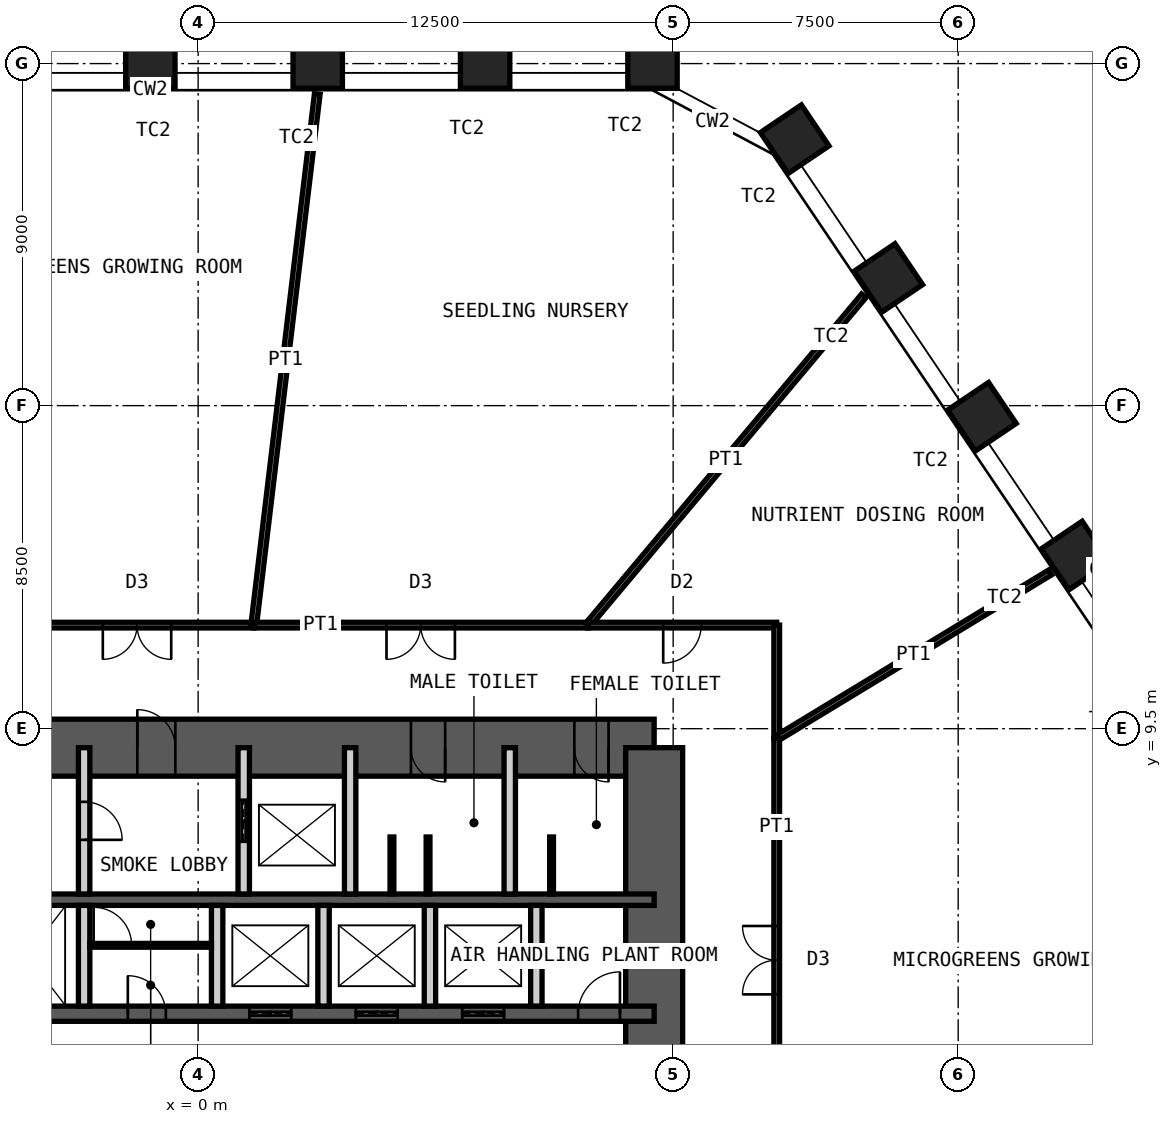
"""IFC4 building model, lengths in metres.
Left out: names, types, materials, properties, quantities, classifications, styles, units other than length and angle.
Written with IfcOpenShell. Run it as: python <this file> out.ifc"""

import sys

from ifc_helpers import new_model, si_unit, direction, frame, frame_2d, origin, origin_2d, place, context, subcontext, project, spatial, rectangle, hollow_rectangle, extrude, element, fill, save


model = new_model("IFC4")
c1 = context("Model", 3, precision=1e-05, world=origin(), true_north=direction((0.0, 1.0)))
c2 = subcontext(c1, "Body", "Model", "MODEL_VIEW")
j1 = project(units=[si_unit("LENGTHUNIT", "METRE"), si_unit("PLANEANGLEUNIT", "RADIAN")], contexts=[c1])
p1 = place(None, origin())
s1 = spatial("IfcSite", under=j1, at=p1, CompositionType="ELEMENT")
p2 = place(p1, origin())
s2 = spatial("IfcBuilding", under=s1, at=p2, CompositionType="ELEMENT")
p3 = place(p2, frame((0.0, 0.0, 87.0)))
s3 = spatial("IfcBuildingStorey", under=s2, at=p3, CompositionType="ELEMENT", Elevation=87.0)
for number, where, z_axis, x_axis in (
    (1, (-1.258, 27.0, 0.0), (0.0, 0.0, 1.0), (-1.0, 0.0, 0.0)),
    (2, (3.147, 27.0, 0.0), (0.0, 0.0, 1.0), (-1.0, 0.0, 0.0)),
    (3, (7.552, 27.0, 0.0), (0.0, 0.0, 1.0), (-1.0, 0.0, 0.0)),
    (4, (11.956, 27.0, 0.0), (0.0, 0.0, 1.0), (-1.0, 0.0, 0.0)),
    (5, (15.698, 25.01, 0.0), (0.0, 0.0, 1.0), (-0.559, 0.829, 0.0)),
    (6, (18.161, 21.359, 0.0), (0.0, 0.0, 1.0), (-0.559, 0.829, 0.0)),
    (7, (20.624, 17.707, 0.0), (0.0, 0.0, 1.0), (-0.559, 0.829, 0.0)),
    (8, (23.087, 14.056, 0.0), (0.0, 0.0, 1.0), (-0.559, 0.829, 0.0)),
):
    element("IfcColumn", number, at=place(p3, frame(where, z_axis=z_axis, x_axis=x_axis)), inside=s3, PredefinedType="COLUMN", context=c2, shape_type="SweptSolid", body=[
        extrude(hollow_rectangle(XDim=1.3, YDim=1.3, WallThickness=0.1, at=origin_2d()), origin(), (0.0, 0.0, 1.0), 5.0),
    ])
p4 = place(p3, frame((-12.0, 9.0, 0.0), z_axis=(0.0, 0.0, 1.0), x_axis=(1.0, 0.0, 0.0)))
e9 = element("IfcWall", 9, at=p4, inside=s3, PredefinedType="SHEAR", context=c2, shape_type="SweptSolid", body=[
    extrude(rectangle(XDim=24.0, YDim=1.5, at=frame_2d((12.0, 0.0))), origin(), (0.0, 0.0, 1.0), 5.0),
])
p5 = place(p4, frame((10.4, 0.0, 0.0)))
e10 = element("IfcOpeningElement", 10, at=p5, cuts=e9, PredefinedType="OPENING", context=c2, shape_type="SweptSolid", body=[
    extrude(rectangle(XDim=1.0, YDim=2.1, at=frame_2d((0.5, 1.05))), frame((0.0, 0.76, 0.0), z_axis=(0.0, -1.0, 0.0), x_axis=(1.0, 0.0, 0.0)), (0.0, 0.0, 1.0), 1.52),
])
p6 = place(p4, frame((17.6, 0.0, 0.0)))
e11 = element("IfcOpeningElement", 11, at=p6, cuts=e9, PredefinedType="OPENING", context=c2, shape_type="SweptSolid", body=[
    extrude(rectangle(XDim=0.9, YDim=2.1, at=frame_2d((0.45, 1.05))), frame((0.0, 0.76, 0.0), z_axis=(0.0, -1.0, 0.0), x_axis=(1.0, 0.0, 0.0)), (0.0, 0.0, 1.0), 1.52),
])
p7 = place(p4, frame((21.9, 0.0, 0.0)))
e12 = element("IfcOpeningElement", 12, at=p7, cuts=e9, PredefinedType="OPENING", context=c2, shape_type="SweptSolid", body=[
    extrude(rectangle(XDim=0.9, YDim=2.1, at=frame_2d((0.45, 1.05))), frame((0.0, 0.76, 0.0), z_axis=(0.0, -1.0, 0.0), x_axis=(1.0, 0.0, 0.0)), (0.0, 0.0, 1.0), 1.52),
])
p8 = place(p3, frame((12.0, -9.0, 0.0), z_axis=(0.0, 0.0, 1.0), x_axis=(0.0, 1.0, 0.0)))
e13 = element("IfcWall", 13, at=p8, inside=s3, PredefinedType="SHEAR", context=c2, shape_type="SweptSolid", body=[
    extrude(rectangle(XDim=18.0, YDim=1.5, at=frame_2d((9.0, 0.0))), origin(), (0.0, 0.0, 1.0), 5.0),
])
p9 = place(p8, frame((8.1, 0.0, 0.0)))
e14 = element("IfcOpeningElement", 14, at=p9, cuts=e13, PredefinedType="OPENING", context=c2, shape_type="SweptSolid", body=[
    extrude(rectangle(XDim=1.8, YDim=2.1, at=frame_2d((0.9, 1.05))), frame((0.0, 0.76, 0.0), z_axis=(0.0, -1.0, 0.0), x_axis=(1.0, 0.0, 0.0)), (0.0, 0.0, 1.0), 1.52),
])
p10 = place(p3, frame((-12.0, 5.0, 0.0), z_axis=(0.0, 0.0, 1.0), x_axis=(1.0, 0.0, 0.0)))
e15 = element("IfcWall", 15, at=p10, inside=s3, PredefinedType="SHEAR", context=c2, shape_type="SweptSolid", body=[
    extrude(rectangle(XDim=24.0, YDim=0.3, at=frame_2d((12.0, 0.0))), origin(), (0.0, 0.0, 1.0), 5.0),
])
p11 = place(p3, frame((-12.0, 2.0, 0.0), z_axis=(0.0, 0.0, 1.0), x_axis=(1.0, 0.0, 0.0)))
e16 = element("IfcWall", 16, at=p11, inside=s3, PredefinedType="SHEAR", context=c2, shape_type="SweptSolid", body=[
    extrude(rectangle(XDim=24.0, YDim=0.4, at=frame_2d((12.0, 0.0))), origin(), (0.0, 0.0, 1.0), 5.0),
])
p12 = place(p11, frame((2.4, 0.0, 0.0)))
e17 = element("IfcOpeningElement", 17, at=p12, cuts=e16, PredefinedType="OPENING", context=c2, shape_type="SweptSolid", body=[
    extrude(rectangle(XDim=1.1, YDim=2.1, at=frame_2d((0.55, 1.05))), frame((0.0, 0.21, 0.0), z_axis=(0.0, -1.0, 0.0), x_axis=(1.0, 0.0, 0.0)), (0.0, 0.0, 1.0), 0.42),
])
p13 = place(p11, frame((22.0, 0.0, 0.0)))
e18 = element("IfcOpeningElement", 18, at=p13, cuts=e16, PredefinedType="OPENING", context=c2, shape_type="SweptSolid", body=[
    extrude(rectangle(XDim=1.1, YDim=2.1, at=frame_2d((0.55, 1.05))), frame((0.0, 0.21, 0.0), z_axis=(0.0, -1.0, 0.0), x_axis=(1.0, 0.0, 0.0)), (0.0, 0.0, 1.0), 0.42),
])
p14 = place(p11, frame((10.15, 0.0, 0.0)))
e19 = element("IfcOpeningElement", 19, at=p14, cuts=e16, PredefinedType="OPENING", context=c2, shape_type="SweptSolid", body=[
    extrude(rectangle(XDim=1.0, YDim=2.1, at=frame_2d((0.5, 1.05))), frame((0.0, 0.21, 0.0), z_axis=(0.0, -1.0, 0.0), x_axis=(1.0, 0.0, 0.0)), (0.0, 0.0, 1.0), 0.42),
])
p15 = place(p11, frame((6.7, 0.0, 0.0)))
e20 = element("IfcOpeningElement", 20, at=p15, cuts=e16, PredefinedType="OPENING", context=c2, shape_type="SweptSolid", body=[
    extrude(rectangle(XDim=1.4, YDim=2.4, at=frame_2d((0.7, 1.2))), frame((0.0, 0.21, 0.0), z_axis=(0.0, -1.0, 0.0), x_axis=(1.0, 0.0, 0.0)), (0.0, 0.0, 1.0), 0.42),
])
p16 = place(p11, frame((13.35, 0.0, 0.0)))
e21 = element("IfcOpeningElement", 21, at=p16, cuts=e16, PredefinedType="OPENING", context=c2, shape_type="SweptSolid", body=[
    extrude(rectangle(XDim=1.1, YDim=2.4, at=frame_2d((0.55, 1.2))), frame((0.0, 0.21, 0.0), z_axis=(0.0, -1.0, 0.0), x_axis=(1.0, 0.0, 0.0)), (0.0, 0.0, 1.0), 0.42),
])
p17 = place(p11, frame((16.15, 0.0, 0.0)))
e22 = element("IfcOpeningElement", 22, at=p17, cuts=e16, PredefinedType="OPENING", context=c2, shape_type="SweptSolid", body=[
    extrude(rectangle(XDim=1.1, YDim=2.4, at=frame_2d((0.55, 1.2))), frame((0.0, 0.21, 0.0), z_axis=(0.0, -1.0, 0.0), x_axis=(1.0, 0.0, 0.0)), (0.0, 0.0, 1.0), 0.42),
])
p18 = place(p11, frame((18.95, 0.0, 0.0)))
e23 = element("IfcOpeningElement", 23, at=p18, cuts=e16, PredefinedType="OPENING", context=c2, shape_type="SweptSolid", body=[
    extrude(rectangle(XDim=1.1, YDim=2.4, at=frame_2d((0.55, 1.2))), frame((0.0, 0.21, 0.0), z_axis=(0.0, -1.0, 0.0), x_axis=(1.0, 0.0, 0.0)), (0.0, 0.0, 1.0), 0.42),
])
p19 = place(p3, frame((-3.0, 5.15, 0.0), z_axis=(0.0, 0.0, 1.0), x_axis=(0.0, 1.0, 0.0)))
e24 = element("IfcWall", 24, at=p19, inside=s3, PredefinedType="PARTITIONING", context=c2, shape_type="SweptSolid", body=[
    extrude(rectangle(XDim=3.85, YDim=0.3, at=frame_2d((1.925, 0.0))), origin(), (0.0, 0.0, 1.0), 4.78),
])
p20 = place(p19, frame((1.425, 0.0, 0.0)))
e25 = element("IfcOpeningElement", 25, at=p20, cuts=e24, PredefinedType="OPENING", context=c2, shape_type="SweptSolid", body=[
    extrude(rectangle(XDim=1.0, YDim=2.1, at=frame_2d((0.5, 1.05))), frame((0.0, 0.16, 0.0), z_axis=(0.0, -1.0, 0.0), x_axis=(1.0, 0.0, 0.0)), (0.0, 0.0, 1.0), 0.32),
])
p21 = place(p3, frame((1.2, 5.15, 0.0), z_axis=(0.0, 0.0, 1.0), x_axis=(0.0, 1.0, 0.0)))
e26 = element("IfcWall", 26, at=p21, inside=s3, PredefinedType="PARTITIONING", context=c2, shape_type="SweptSolid", body=[
    extrude(rectangle(XDim=3.85, YDim=0.3, at=frame_2d((1.925, 0.0))), origin(), (0.0, 0.0, 1.0), 4.78),
])
p22 = place(p21, frame((1.375, 0.0, 0.0)))
e27 = element("IfcOpeningElement", 27, at=p22, cuts=e26, PredefinedType="OPENING", context=c2, shape_type="SweptSolid", body=[
    extrude(rectangle(XDim=1.1, YDim=2.4, at=frame_2d((0.55, 1.2))), frame((0.0, 0.16, 0.0), z_axis=(0.0, -1.0, 0.0), x_axis=(1.0, 0.0, 0.0)), (0.0, 0.0, 1.0), 0.32),
])
for number, where, z_axis, x_axis in (
    (28, (4.0, 5.15, 0.0), (0.0, 0.0, 1.0), (0.0, 1.0, 0.0)),
    (29, (8.2, 5.15, 0.0), (0.0, 0.0, 1.0), (0.0, 1.0, 0.0)),
):
    element("IfcWall", number, at=place(p3, frame(where, z_axis=z_axis, x_axis=x_axis)), inside=s3, PredefinedType="PARTITIONING", context=c2, shape_type="SweptSolid", body=[
        extrude(rectangle(XDim=3.85, YDim=0.3, at=frame_2d((1.925, 0.0))), origin(), (0.0, 0.0, 1.0), 4.78),
    ])
for number, where, z_axis, x_axis in (
    (30, (-3.0, 2.2, 0.0), (0.0, 0.0, 1.0), (0.0, 1.0, 0.0)),
    (31, (0.5, 2.2, 0.0), (0.0, 0.0, 1.0), (0.0, 1.0, 0.0)),
    (32, (3.3, 2.2, 0.0), (0.0, 0.0, 1.0), (0.0, 1.0, 0.0)),
    (33, (6.1, 2.2, 0.0), (0.0, 0.0, 1.0), (0.0, 1.0, 0.0)),
    (34, (8.9, 2.2, 0.0), (0.0, 0.0, 1.0), (0.0, 1.0, 0.0)),
):
    element("IfcWall", number, at=place(p3, frame(where, z_axis=z_axis, x_axis=x_axis)), inside=s3, PredefinedType="PARTITIONING", context=c2, shape_type="SweptSolid", body=[
        extrude(rectangle(XDim=2.65, YDim=0.3, at=frame_2d((1.325, 0.0))), origin(), (0.0, 0.0, 1.0), 4.78),
    ])
p23 = place(p3, frame((-2.85, 3.8, 0.0), z_axis=(0.0, 0.0, 1.0), x_axis=(1.0, 0.0, 0.0)))
e35 = element("IfcWall", 35, at=p23, inside=s3, PredefinedType="PARTITIONING", context=c2, shape_type="SweptSolid", body=[
    extrude(rectangle(XDim=3.2, YDim=0.1, at=frame_2d((1.6, 0.0))), origin(), (0.0, 0.0, 1.0), 4.78),
])
p24 = place(p23, frame((0.1, 0.0, 0.0)))
e36 = element("IfcOpeningElement", 36, at=p24, cuts=e35, PredefinedType="OPENING", context=c2, shape_type="SweptSolid", body=[
    extrude(rectangle(XDim=1.0, YDim=2.4, at=frame_2d((0.5, 1.2))), frame((0.0, 0.06, 0.0), z_axis=(0.0, -1.0, 0.0), x_axis=(1.0, 0.0, 0.0)), (0.0, 0.0, 1.0), 0.12),
])
for number, where, z_axis, x_axis in (
    (37, (5.1, 5.15, 0.0), (0.0, 0.0, 1.0), (0.0, 1.0, 0.0)),
    (38, (6.05, 5.15, 0.0), (0.0, 0.0, 1.0), (0.0, 1.0, 0.0)),
    (39, (9.3, 5.15, 0.0), (0.0, 0.0, 1.0), (0.0, 1.0, 0.0)),
):
    element("IfcWall", number, at=place(p3, frame(where, z_axis=z_axis, x_axis=x_axis)), inside=s3, PredefinedType="PARTITIONING", context=c2, shape_type="SweptSolid", body=[
        extrude(rectangle(XDim=1.5, YDim=0.1, at=frame_2d((0.75, 0.0))), origin(), (0.0, 0.0, 1.0), 2.1),
    ])
p25 = place(p3, frame((-4.679, 12.225, 0.0), z_axis=(0.0, 0.0, 1.0), x_axis=(1.0, 0.0, 0.0)))
e40 = element("IfcWall", 40, at=p25, inside=s3, PredefinedType="PARTITIONING", context=c2, shape_type="SweptSolid", body=[
    extrude(rectangle(XDim=6.142, YDim=0.15, at=frame_2d((3.071, 0.0))), origin(), (0.0, 0.0, 1.0), 4.8),
])
p26 = place(p25, frame((2.171, 0.0, 0.0)))
e41 = element("IfcOpeningElement", 41, at=p26, cuts=e40, PredefinedType="OPENING", context=c2, shape_type="SweptSolid", body=[
    extrude(rectangle(XDim=1.8, YDim=2.4, at=frame_2d((0.9, 1.2))), frame((0.0, 0.085, 0.0), z_axis=(0.0, -1.0, 0.0), x_axis=(1.0, 0.0, 0.0)), (0.0, 0.0, 1.0), 0.17),
])
p27 = place(p3, frame((3.135, 26.201, 0.0), z_axis=(0.0, 0.0, 1.0), x_axis=(-0.118798442734, -0.992918390405, 0.0)))
e42 = element("IfcWall", 42, at=p27, inside=s3, PredefinedType="PARTITIONING", context=c2, shape_type="SweptSolid", body=[
    extrude(rectangle(XDim=14.075, YDim=0.15, at=frame_2d((7.038, 0.0))), origin(), (0.0, 0.0, 1.0), 3.7),
])
p28 = place(p3, frame((1.463, 12.225, 0.0), z_axis=(0.0, 0.0, 1.0), x_axis=(1.0, 0.0, 0.0)))
e43 = element("IfcWall", 43, at=p28, inside=s3, PredefinedType="PARTITIONING", context=c2, shape_type="SweptSolid", body=[
    extrude(rectangle(XDim=8.788, YDim=0.15, at=frame_2d((4.394, 0.0))), origin(), (0.0, 0.0, 1.0), 4.8),
])
p29 = place(p28, frame((3.494, 0.0, 0.0)))
e44 = element("IfcOpeningElement", 44, at=p29, cuts=e43, PredefinedType="OPENING", context=c2, shape_type="SweptSolid", body=[
    extrude(rectangle(XDim=1.8, YDim=2.4, at=frame_2d((0.9, 1.2))), frame((0.0, 0.085, 0.0), z_axis=(0.0, -1.0, 0.0), x_axis=(1.0, 0.0, 0.0)), (0.0, 0.0, 1.0), 0.17),
])
p30 = place(p3, frame((17.517, 20.891, 0.0), z_axis=(0.0, 0.0, 1.0), x_axis=(-0.642521498084, -0.766267658524, 0.0)))
e45 = element("IfcWall", 45, at=p30, inside=s3, PredefinedType="PARTITIONING", context=c2, shape_type="SweptSolid", body=[
    extrude(rectangle(XDim=11.309, YDim=0.15, at=frame_2d((5.654, 0.0))), origin(), (0.0, 0.0, 1.0), 3.7),
])
p31 = place(p3, frame((10.25, 12.225, 0.0), z_axis=(0.0, 0.0, 1.0), x_axis=(1.0, 0.0, 0.0)))
e46 = element("IfcWall", 46, at=p31, inside=s3, PredefinedType="PARTITIONING", context=c2, shape_type="SweptSolid", body=[
    extrude(rectangle(XDim=4.975, YDim=0.15, at=frame_2d((2.487, 0.0))), origin(), (0.0, 0.0, 1.0), 4.8),
])
p32 = place(p31, frame((1.987, 0.0, 0.0)))
e47 = element("IfcOpeningElement", 47, at=p32, cuts=e46, PredefinedType="OPENING", context=c2, shape_type="SweptSolid", body=[
    extrude(rectangle(XDim=1.0, YDim=2.4, at=frame_2d((0.5, 1.2))), frame((0.0, 0.085, 0.0), z_axis=(0.0, -1.0, 0.0), x_axis=(1.0, 0.0, 0.0)), (0.0, 0.0, 1.0), 0.17),
])
p33 = place(p3, frame((15.225, 12.225, 0.0), z_axis=(0.0, 0.0, 1.0), x_axis=(0.0, -1.0, 0.0)))
e48 = element("IfcWall", 48, at=p33, inside=s3, PredefinedType="PARTITIONING", context=c2, shape_type="SweptSolid", body=[
    extrude(rectangle(XDim=2.982, YDim=0.15, at=frame_2d((1.491, 0.0))), origin(), (0.0, 0.0, 1.0), 4.8),
])
p34 = place(p3, frame((22.421, 13.612, 0.0), z_axis=(0.0, 0.0, 1.0), x_axis=(-0.854789353023, -0.518975107263, 0.0)))
e49 = element("IfcWall", 49, at=p34, inside=s3, PredefinedType="PARTITIONING", context=c2, shape_type="SweptSolid", body=[
    extrude(rectangle(XDim=8.419, YDim=0.15, at=frame_2d((4.209, 0.0))), origin(), (0.0, 0.0, 1.0), 3.7),
])
p35 = place(p3, frame((15.225, 9.243, 0.0), z_axis=(0.0, 0.0, 1.0), x_axis=(0.0, -1.0, 0.0)))
e50 = element("IfcWall", 50, at=p35, inside=s3, PredefinedType="PARTITIONING", context=c2, shape_type="SweptSolid", body=[
    extrude(rectangle(XDim=11.669, YDim=0.15, at=frame_2d((5.835, 0.0))), origin(), (0.0, 0.0, 1.0), 4.8),
])
p36 = place(p35, frame((4.935, 0.0, 0.0)))
e51 = element("IfcOpeningElement", 51, at=p36, cuts=e50, PredefinedType="OPENING", context=c2, shape_type="SweptSolid", body=[
    extrude(rectangle(XDim=1.8, YDim=2.4, at=frame_2d((0.9, 1.2))), frame((0.0, 0.085, 0.0), z_axis=(0.0, -1.0, 0.0), x_axis=(1.0, 0.0, 0.0)), (0.0, 0.0, 1.0), 0.17),
])
p37 = place(p5, origin())
e52 = element("IfcDoor", 52, at=p37, inside=s3, OperationType="SINGLE_SWING_RIGHT", PredefinedType="DOOR", context=c2, shape_type="SweptSolid", body=[
    extrude(rectangle(XDim=1.0, YDim=2.1, at=frame_2d((0.5, 1.05))), frame((0.0, 0.025, 0.0), z_axis=(0.0, -1.0, 0.0), x_axis=(1.0, 0.0, 0.0)), (0.0, 0.0, 1.0), 0.05),
])
fill(e10, e52)
p38 = place(p6, origin())
e53 = element("IfcDoor", 53, at=p38, inside=s3, OperationType="SINGLE_SWING_RIGHT", PredefinedType="DOOR", context=c2, shape_type="SweptSolid", body=[
    extrude(rectangle(XDim=0.9, YDim=2.1, at=frame_2d((0.45, 1.05))), frame((0.0, 0.025, 0.0), z_axis=(0.0, -1.0, 0.0), x_axis=(1.0, 0.0, 0.0)), (0.0, 0.0, 1.0), 0.05),
])
fill(e11, e53)
p39 = place(p7, origin())
e54 = element("IfcDoor", 54, at=p39, inside=s3, OperationType="SINGLE_SWING_RIGHT", PredefinedType="DOOR", context=c2, shape_type="SweptSolid", body=[
    extrude(rectangle(XDim=0.9, YDim=2.1, at=frame_2d((0.45, 1.05))), frame((0.0, 0.025, 0.0), z_axis=(0.0, -1.0, 0.0), x_axis=(1.0, 0.0, 0.0)), (0.0, 0.0, 1.0), 0.05),
])
fill(e12, e54)
p40 = place(p20, origin())
e55 = element("IfcDoor", 55, at=p40, inside=s3, OperationType="SINGLE_SWING_LEFT", PredefinedType="DOOR", context=c2, shape_type="SweptSolid", body=[
    extrude(rectangle(XDim=1.0, YDim=2.1, at=frame_2d((0.5, 1.05))), frame((0.0, 0.025, 0.0), z_axis=(0.0, -1.0, 0.0), x_axis=(1.0, 0.0, 0.0)), (0.0, 0.0, 1.0), 0.05),
])
fill(e25, e55)
p41 = place(p13, origin())
e56 = element("IfcDoor", 56, at=p41, inside=s3, OperationType="SINGLE_SWING_LEFT", PredefinedType="DOOR", context=c2, shape_type="SweptSolid", body=[
    extrude(rectangle(XDim=1.1, YDim=2.1, at=frame_2d((0.55, 1.05))), frame((0.0, 0.025, 0.0), z_axis=(0.0, -1.0, 0.0), x_axis=(1.0, 0.0, 0.0)), (0.0, 0.0, 1.0), 0.05),
])
fill(e18, e56)
p42 = place(p14, origin())
e57 = element("IfcDoor", 57, at=p42, inside=s3, OperationType="SINGLE_SWING_RIGHT", PredefinedType="DOOR", context=c2, shape_type="SweptSolid", body=[
    extrude(rectangle(XDim=1.0, YDim=2.1, at=frame_2d((0.5, 1.05))), frame((0.0, 0.025, 0.0), z_axis=(0.0, -1.0, 0.0), x_axis=(1.0, 0.0, 0.0)), (0.0, 0.0, 1.0), 0.05),
])
fill(e19, e57)
p43 = place(p22, origin())
e58 = element("IfcDoor", 58, at=p43, inside=s3, OperationType="DOUBLE_DOOR_SLIDING", PredefinedType="DOOR", context=c2, shape_type="SweptSolid", body=[
    extrude(rectangle(XDim=1.1, YDim=2.4, at=frame_2d((0.55, 1.2))), frame((0.0, 0.025, 0.0), z_axis=(0.0, -1.0, 0.0), x_axis=(1.0, 0.0, 0.0)), (0.0, 0.0, 1.0), 0.05),
])
fill(e27, e58)
p44 = place(p16, origin())
e59 = element("IfcDoor", 59, at=p44, inside=s3, OperationType="DOUBLE_DOOR_SLIDING", PredefinedType="DOOR", context=c2, shape_type="SweptSolid", body=[
    extrude(rectangle(XDim=1.1, YDim=2.4, at=frame_2d((0.55, 1.2))), frame((0.0, 0.025, 0.0), z_axis=(0.0, -1.0, 0.0), x_axis=(1.0, 0.0, 0.0)), (0.0, 0.0, 1.0), 0.05),
])
fill(e21, e59)
p45 = place(p17, origin())
e60 = element("IfcDoor", 60, at=p45, inside=s3, OperationType="DOUBLE_DOOR_SLIDING", PredefinedType="DOOR", context=c2, shape_type="SweptSolid", body=[
    extrude(rectangle(XDim=1.1, YDim=2.4, at=frame_2d((0.55, 1.2))), frame((0.0, 0.025, 0.0), z_axis=(0.0, -1.0, 0.0), x_axis=(1.0, 0.0, 0.0)), (0.0, 0.0, 1.0), 0.05),
])
fill(e22, e60)
p46 = place(p18, origin())
e61 = element("IfcDoor", 61, at=p46, inside=s3, OperationType="DOUBLE_DOOR_SLIDING", PredefinedType="DOOR", context=c2, shape_type="SweptSolid", body=[
    extrude(rectangle(XDim=1.1, YDim=2.4, at=frame_2d((0.55, 1.2))), frame((0.0, 0.025, 0.0), z_axis=(0.0, -1.0, 0.0), x_axis=(1.0, 0.0, 0.0)), (0.0, 0.0, 1.0), 0.05),
])
fill(e23, e61)
p47 = place(p24, origin())
e62 = element("IfcDoor", 62, at=p47, inside=s3, OperationType="SINGLE_SWING_RIGHT", PredefinedType="DOOR", context=c2, shape_type="SweptSolid", body=[
    extrude(rectangle(XDim=1.0, YDim=2.4, at=frame_2d((0.5, 1.2))), frame((0.0, 0.025, 0.0), z_axis=(0.0, -1.0, 0.0), x_axis=(1.0, 0.0, 0.0)), (0.0, 0.0, 1.0), 0.05),
])
fill(e36, e62)
p48 = place(p26, origin())
e63 = element("IfcDoor", 63, at=p48, inside=s3, OperationType="DOUBLE_DOOR_DOUBLE_SWING", PredefinedType="DOOR", context=c2, shape_type="SweptSolid", body=[
    extrude(rectangle(XDim=1.8, YDim=2.4, at=frame_2d((0.9, 1.2))), frame((0.0, 0.025, 0.0), z_axis=(0.0, -1.0, 0.0), x_axis=(1.0, 0.0, 0.0)), (0.0, 0.0, 1.0), 0.05),
])
fill(e41, e63)
p49 = place(p29, origin())
e64 = element("IfcDoor", 64, at=p49, inside=s3, OperationType="DOUBLE_DOOR_DOUBLE_SWING", PredefinedType="DOOR", context=c2, shape_type="SweptSolid", body=[
    extrude(rectangle(XDim=1.8, YDim=2.4, at=frame_2d((0.9, 1.2))), frame((0.0, 0.025, 0.0), z_axis=(0.0, -1.0, 0.0), x_axis=(1.0, 0.0, 0.0)), (0.0, 0.0, 1.0), 0.05),
])
fill(e44, e64)
p50 = place(p32, origin())
e65 = element("IfcDoor", 65, at=p50, inside=s3, OperationType="SINGLE_SWING_LEFT", PredefinedType="DOOR", context=c2, shape_type="SweptSolid", body=[
    extrude(rectangle(XDim=1.0, YDim=2.4, at=frame_2d((0.5, 1.2))), frame((0.0, 0.025, 0.0), z_axis=(0.0, -1.0, 0.0), x_axis=(1.0, 0.0, 0.0)), (0.0, 0.0, 1.0), 0.05),
])
fill(e47, e65)
p51 = place(p36, origin())
e66 = element("IfcDoor", 66, at=p51, inside=s3, OperationType="DOUBLE_DOOR_DOUBLE_SWING", PredefinedType="DOOR", context=c2, shape_type="SweptSolid", body=[
    extrude(rectangle(XDim=1.8, YDim=2.4, at=frame_2d((0.9, 1.2))), frame((0.0, 0.025, 0.0), z_axis=(0.0, -1.0, 0.0), x_axis=(1.0, 0.0, 0.0)), (0.0, 0.0, 1.0), 0.05),
])
fill(e51, e66)
save(model, sys.argv[1])
